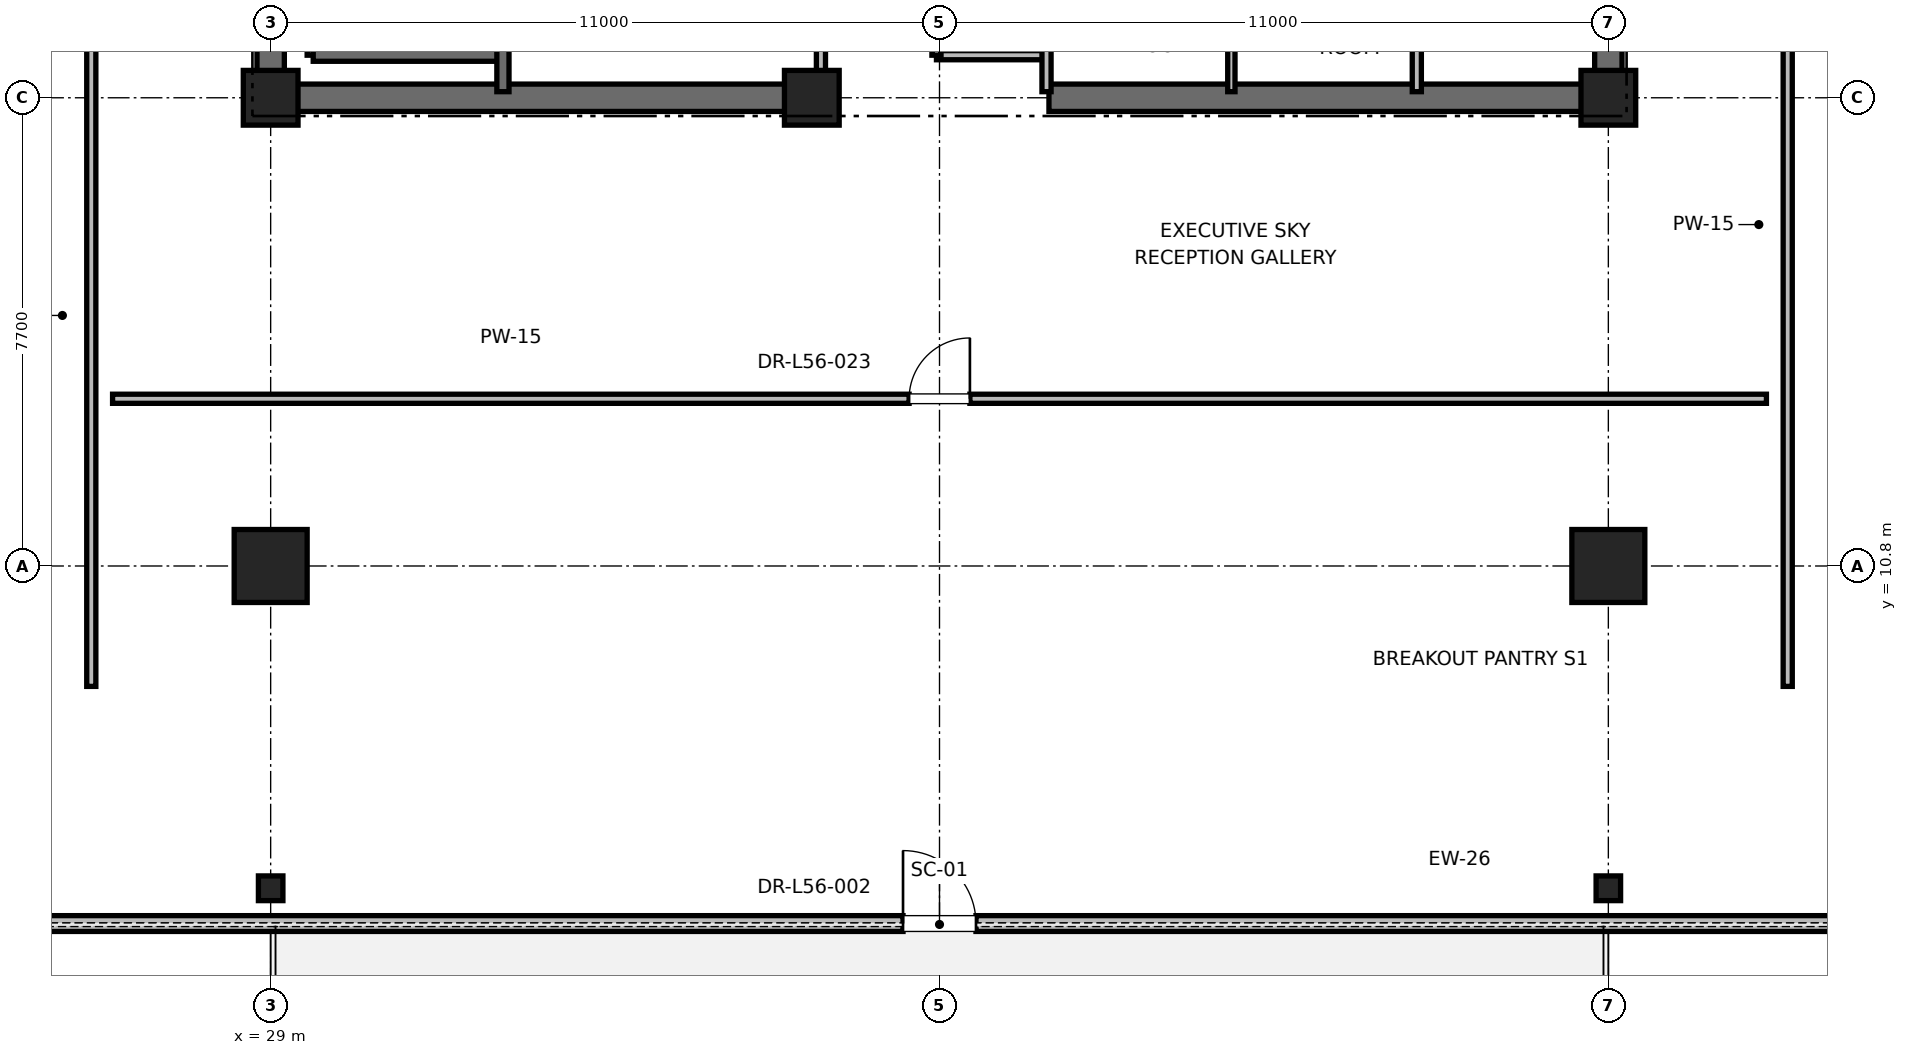
"""IFC4 building model, lengths in metres.
Left out: names, types, materials, properties, quantities, classifications, styles, units other than length and angle.
Written with IfcOpenShell. Run it as: python <this file> out.ifc"""

import sys

from ifc_helpers import new_model, si_unit, direction, frame, frame_2d, origin, origin_2d, place, context, subcontext, project, spatial, rectangle, i_section, extrude, element, fill, save


model = new_model("IFC4")
c1 = context("Model", 3, precision=1e-05, world=origin(), true_north=direction((0.0, 1.0)))
c2 = subcontext(c1, "Body", "Model", "MODEL_VIEW")
j1 = project(units=[si_unit("LENGTHUNIT", "METRE"), si_unit("PLANEANGLEUNIT", "RADIAN")], contexts=[c1])
p1 = place(None, origin())
s1 = spatial("IfcSite", under=j1, at=p1, CompositionType="ELEMENT")
p2 = place(p1, origin())
s2 = spatial("IfcBuilding", under=s1, at=p2, CompositionType="ELEMENT")
p3 = place(p2, frame((0.0, 0.0, 243.2)))
s3 = spatial("IfcBuildingStorey", under=s2, at=p3, CompositionType="ELEMENT", Elevation=243.2)
for number, where, z_axis, x_axis in (
    (1, (29.0, 10.8, 0.0), (0.0, 0.0, 1.0), (1.0, 0.0, 0.0)),
    (2, (51.0, 10.8, 0.0), (0.0, 0.0, 1.0), (1.0, 0.0, 0.0)),
):
    element("IfcColumn", number, at=place(p3, frame(where, z_axis=z_axis, x_axis=x_axis)), inside=s3, PredefinedType="COLUMN", context=c2, shape_type="SweptSolid", body=[
        extrude(rectangle(XDim=1.2, YDim=1.2, at=origin_2d()), origin(), (0.0, 0.0, 1.0), 4.0),
    ])
for number, where, z_axis, x_axis in (
    (3, (29.0, 5.5, 0.0), (0.0, 0.0, 1.0), (1.0, 0.0, 0.0)),
    (4, (51.0, 5.5, 0.0), (0.0, 0.0, 1.0), (1.0, 0.0, 0.0)),
):
    element("IfcColumn", number, at=place(p3, frame(where, z_axis=z_axis, x_axis=x_axis)), inside=s3, PredefinedType="COLUMN", context=c2, shape_type="SweptSolid", body=[
        extrude(i_section(OverallWidth=0.403, OverallDepth=0.406, WebThickness=0.027, FlangeThickness=0.043, FilletRadius=0.015, at=origin_2d()), origin(), (0.0, 0.0, 1.0), 4.0),
    ])
for number, where, z_axis, x_axis in (
    (5, (29.0, 18.5, 0.0), (0.0, 0.0, 1.0), (1.0, 0.0, 0.0)),
    (6, (51.0, 18.5, 0.0), (0.0, 0.0, 1.0), (1.0, 0.0, 0.0)),
    (7, (37.9, 18.5, 0.0), (0.0, 0.0, 1.0), (1.0, 0.0, 0.0)),
):
    element("IfcColumn", number, at=place(p3, frame(where, z_axis=z_axis, x_axis=x_axis)), inside=s3, PredefinedType="PILASTER", context=c2, shape_type="SweptSolid", body=[
        extrude(rectangle(XDim=0.9, YDim=0.9, at=origin_2d()), origin(), (0.0, 0.0, 1.0), 4.0),
    ])
for number, where, z_axis, x_axis in (
    (8, (29.0, 18.5, 0.0), (0.0, 0.0, 1.0), (1.0, 0.0, 0.0)),
    (9, (41.8, 18.5, 0.0), (0.0, 0.0, 1.0), (1.0, 0.0, 0.0)),
):
    element("IfcWall", number, at=place(p3, frame(where, z_axis=z_axis, x_axis=x_axis)), inside=s3, PredefinedType="SHEAR", context=c2, shape_type="SweptSolid", body=[
        extrude(rectangle(XDim=9.2, YDim=0.45, at=frame_2d((4.6, 0.0))), origin(), (0.0, 0.0, 1.0), 3.785),
    ])
p4 = place(p3, frame((29.0, 18.5, 0.0), z_axis=(0.0, 0.0, 1.0), x_axis=(0.0, 1.0, 0.0)))
e10 = element("IfcWall", 10, at=p4, inside=s3, PredefinedType="SHEAR", context=c2, shape_type="SweptSolid", body=[
    extrude(rectangle(XDim=8.8, YDim=0.45, at=frame_2d((4.4, 0.0))), origin(), (0.0, 0.0, 1.0), 3.785),
])
p5 = place(p3, frame((51.0, 18.5, 0.0), z_axis=(0.0, 0.0, 1.0), x_axis=(0.0, 1.0, 0.0)))
e11 = element("IfcWall", 11, at=p5, inside=s3, PredefinedType="SHEAR", context=c2, shape_type="SweptSolid", body=[
    extrude(rectangle(XDim=5.8, YDim=0.45, at=frame_2d((2.9, 0.0))), origin(), (0.0, 0.0, 1.0), 3.785),
])
p6 = place(p3, frame((17.692, 4.92, 0.0), z_axis=(0.0, 0.0, 1.0), x_axis=(1.0, 0.0, 0.0)))
e12 = element("IfcWall", 12, at=p6, inside=s3, PredefinedType="PARAPET", context=c2, shape_type="SweptSolid", body=[
    extrude(rectangle(XDim=44.615, YDim=0.26, at=frame_2d((22.308, 0.0))), origin(), (0.0, 0.0, 1.0), 3.123),
])
p7 = place(p6, frame((4.2, 0.0, 0.85)))
e13 = element("IfcOpeningElement", 13, at=p7, cuts=e12, PredefinedType="OPENING", context=c2, shape_type="SweptSolid", body=[
    extrude(rectangle(XDim=1.6, YDim=2.1, at=frame_2d((0.8, 1.05))), frame((0.0, 0.13, 0.0), z_axis=(0.0, -1.0, 0.0), x_axis=(1.0, 0.0, 0.0)), (0.0, 0.0, 1.0), 0.26),
])
p8 = place(p6, frame((21.708, 0.0, 0.0)))
e14 = element("IfcOpeningElement", 14, at=p8, cuts=e12, PredefinedType="OPENING", context=c2, shape_type="SweptSolid", body=[
    extrude(rectangle(XDim=1.2, YDim=2.2, at=frame_2d((0.6, 1.1))), frame((0.0, 0.13, 0.0), z_axis=(0.0, -1.0, 0.0), x_axis=(1.0, 0.0, 0.0)), (0.0, 0.0, 1.0), 0.26),
])
p9 = place(p6, frame((38.815, 0.0, 0.85)))
e15 = element("IfcOpeningElement", 15, at=p9, cuts=e12, PredefinedType="OPENING", context=c2, shape_type="SweptSolid", body=[
    extrude(rectangle(XDim=1.6, YDim=2.1, at=frame_2d((0.8, 1.05))), frame((0.0, 0.13, 0.0), z_axis=(0.0, -1.0, 0.0), x_axis=(1.0, 0.0, 0.0)), (0.0, 0.0, 1.0), 0.26),
])
p10 = place(p3, frame((29.7, 19.2, 0.0), z_axis=(0.0, 0.0, 1.0), x_axis=(0.0, 1.0, 0.0)))
e16 = element("IfcWall", 16, at=p10, inside=s3, PredefinedType="SOLIDWALL", context=c2, shape_type="SweptSolid", body=[
    extrude(rectangle(XDim=8.15, YDim=0.2, at=frame_2d((4.075, 0.0))), origin(), (0.0, 0.0, 1.0), 3.785),
])
p11 = place(p3, frame((29.7, 19.2, 0.0), z_axis=(0.0, 0.0, 1.0), x_axis=(1.0, 0.0, 0.0)))
e17 = element("IfcWall", 17, at=p11, inside=s3, PredefinedType="SOLIDWALL", context=c2, shape_type="SweptSolid", body=[
    extrude(rectangle(XDim=3.12, YDim=0.2, at=frame_2d((1.56, 0.0))), origin(), (0.0, 0.0, 1.0), 3.785),
])
p12 = place(p3, frame((32.82, 18.6, 0.0), z_axis=(0.0, 0.0, 1.0), x_axis=(0.0, 1.0, 0.0)))
e18 = element("IfcWall", 18, at=p12, inside=s3, PredefinedType="SOLIDWALL", context=c2, shape_type="SweptSolid", body=[
    extrude(rectangle(XDim=8.78, YDim=0.2, at=frame_2d((4.39, 0.0))), origin(), (0.0, 0.0, 1.0), 3.785),
])
p13 = place(p3, frame((39.95, 19.2, 0.0), z_axis=(0.0, 0.0, 1.0), x_axis=(1.0, 0.0, 0.0)))
e19 = element("IfcWall", 19, at=p13, inside=s3, PredefinedType="PARTITIONING", context=c2, shape_type="SweptSolid", body=[
    extrude(rectangle(XDim=1.81, YDim=0.15, at=frame_2d((0.905, 0.0))), origin(), (0.0, 0.0, 1.0), 2.85),
])
p14 = place(p3, frame((41.76, 18.6, 0.0), z_axis=(0.0, 0.0, 1.0), x_axis=(0.0, 1.0, 0.0)))
e20 = element("IfcWall", 20, at=p14, inside=s3, PredefinedType="PARTITIONING", context=c2, shape_type="SweptSolid", body=[
    extrude(rectangle(XDim=3.6, YDim=0.15, at=frame_2d((1.8, 0.0))), origin(), (0.0, 0.0, 1.0), 2.85),
])
p15 = place(p3, frame((39.95, 19.2, 0.0), z_axis=(0.0, 0.0, 1.0), x_axis=(0.0, 1.0, 0.0)))
e21 = element("IfcWall", 21, at=p15, inside=s3, PredefinedType="PARTITIONING", context=c2, shape_type="SweptSolid", body=[
    extrude(rectangle(XDim=3.0, YDim=0.15, at=frame_2d((1.5, 0.0))), origin(), (0.0, 0.0, 1.0), 2.85),
])
p16 = place(p15, frame((1.05, 0.0, 0.0)))
e22 = element("IfcOpeningElement", 22, at=p16, cuts=e21, PredefinedType="OPENING", context=c2, shape_type="SweptSolid", body=[
    extrude(rectangle(XDim=0.9, YDim=2.1, at=frame_2d((0.45, 1.05))), frame((0.0, 0.075, 0.0), z_axis=(0.0, -1.0, 0.0), x_axis=(1.0, 0.0, 0.0)), (0.0, 0.0, 1.0), 0.15),
])
p17 = place(p3, frame((38.05, 18.6, 0.0), z_axis=(0.0, 0.0, 1.0), x_axis=(0.0, 1.0, 0.0)))
e23 = element("IfcWall", 23, at=p17, inside=s3, PredefinedType="PARTITIONING", context=c2, shape_type="SweptSolid", body=[
    extrude(rectangle(XDim=4.46, YDim=0.15, at=frame_2d((2.23, 0.0))), origin(), (0.0, 0.0, 1.0), 2.85),
])
p18 = place(p17, frame((1.73, 0.0, 0.0)))
e24 = element("IfcOpeningElement", 24, at=p18, cuts=e23, PredefinedType="OPENING", context=c2, shape_type="SweptSolid", body=[
    extrude(rectangle(XDim=1.0, YDim=2.15, at=frame_2d((0.5, 1.075))), frame((0.0, 0.075, 0.0), z_axis=(0.0, -1.0, 0.0), x_axis=(1.0, 0.0, 0.0)), (0.0, 0.0, 1.0), 0.15),
])
p19 = place(p3, frame((47.85, 18.6, 0.0), z_axis=(0.0, 0.0, 1.0), x_axis=(0.0, 1.0, 0.0)))
e25 = element("IfcWall", 25, at=p19, inside=s3, PredefinedType="PARTITIONING", context=c2, shape_type="SweptSolid", body=[
    extrude(rectangle(XDim=2.54, YDim=0.15, at=frame_2d((1.27, 0.0))), origin(), (0.0, 0.0, 1.0), 2.85),
])
p20 = place(p3, frame((44.8, 18.6, 0.0), z_axis=(0.0, 0.0, 1.0), x_axis=(0.0, 1.0, 0.0)))
e26 = element("IfcWall", 26, at=p20, inside=s3, PredefinedType="PARTITIONING", context=c2, shape_type="SweptSolid", body=[
    extrude(rectangle(XDim=3.02, YDim=0.12, at=frame_2d((1.51, 0.0))), origin(), (0.0, 0.0, 1.0), 2.85),
])
p21 = place(p3, frame((26.4, 13.55, 0.0), z_axis=(0.0, 0.0, 1.0), x_axis=(1.0, 0.0, 0.0)))
e27 = element("IfcWall", 27, at=p21, inside=s3, PredefinedType="PARTITIONING", context=c2, shape_type="SweptSolid", body=[
    extrude(rectangle(XDim=27.2, YDim=0.15, at=frame_2d((13.6, 0.0))), origin(), (0.0, 0.0, 1.0), 2.85),
])
p22 = place(p21, frame((13.1, 0.0, 0.0)))
e28 = element("IfcOpeningElement", 28, at=p22, cuts=e27, PredefinedType="OPENING", context=c2, shape_type="SweptSolid", body=[
    extrude(rectangle(XDim=1.0, YDim=2.15, at=frame_2d((0.5, 1.075))), frame((0.0, 0.075, 0.0), z_axis=(0.0, -1.0, 0.0), x_axis=(1.0, 0.0, 0.0)), (0.0, 0.0, 1.0), 0.15),
])
p23 = place(p3, frame((26.05, 8.82, 0.0), z_axis=(0.0, 0.0, 1.0), x_axis=(0.0, 1.0, 0.0)))
e29 = element("IfcWall", 29, at=p23, inside=s3, PredefinedType="PARTITIONING", context=c2, shape_type="SweptSolid", body=[
    extrude(rectangle(XDim=15.691, YDim=0.15, at=frame_2d((7.846, 0.0))), origin(), (0.0, 0.0, 1.0), 2.85),
])
p24 = place(p23, frame((12.201, 0.0, 0.0)))
e30 = element("IfcOpeningElement", 30, at=p24, cuts=e29, PredefinedType="OPENING", context=c2, shape_type="SweptSolid", body=[
    extrude(rectangle(XDim=1.0, YDim=2.15, at=frame_2d((0.5, 1.075))), frame((0.0, 0.075, 0.0), z_axis=(0.0, -1.0, 0.0), x_axis=(1.0, 0.0, 0.0)), (0.0, 0.0, 1.0), 0.15),
])
p25 = place(p3, frame((53.95, 8.82, 0.0), z_axis=(0.0, 0.0, 1.0), x_axis=(0.0, 1.0, 0.0)))
e31 = element("IfcWall", 31, at=p25, inside=s3, PredefinedType="PARTITIONING", context=c2, shape_type="SweptSolid", body=[
    extrude(rectangle(XDim=21.669, YDim=0.15, at=frame_2d((10.834, 0.0))), origin(), (0.0, 0.0, 1.0), 2.85),
])
p26 = place(p25, frame((15.189, 0.0, 0.0)))
e32 = element("IfcOpeningElement", 32, at=p26, cuts=e31, PredefinedType="OPENING", context=c2, shape_type="SweptSolid", body=[
    extrude(rectangle(XDim=1.0, YDim=2.15, at=frame_2d((0.5, 1.075))), frame((0.0, 0.075, 0.0), z_axis=(0.0, -1.0, 0.0), x_axis=(1.0, 0.0, 0.0)), (0.0, 0.0, 1.0), 0.15),
])
p27 = place(p8, origin())
e33 = element("IfcDoor", 33, at=p27, inside=s3, OperationType="SINGLE_SWING_LEFT", PredefinedType="DOOR", context=c2, shape_type="SweptSolid", body=[
    extrude(rectangle(XDim=1.2, YDim=2.2, at=frame_2d((0.6, 1.1))), frame((0.0, 0.025, 0.0), z_axis=(0.0, -1.0, 0.0), x_axis=(1.0, 0.0, 0.0)), (0.0, 0.0, 1.0), 0.05),
])
fill(e14, e33)
p28 = place(p22, origin())
e34 = element("IfcDoor", 34, at=p28, inside=s3, OperationType="SINGLE_SWING_RIGHT", PredefinedType="DOOR", context=c2, shape_type="SweptSolid", body=[
    extrude(rectangle(XDim=1.0, YDim=2.15, at=frame_2d((0.5, 1.075))), frame((0.0, 0.025, 0.0), z_axis=(0.0, -1.0, 0.0), x_axis=(1.0, 0.0, 0.0)), (0.0, 0.0, 1.0), 0.05),
])
fill(e28, e34)
save(model, sys.argv[1])
